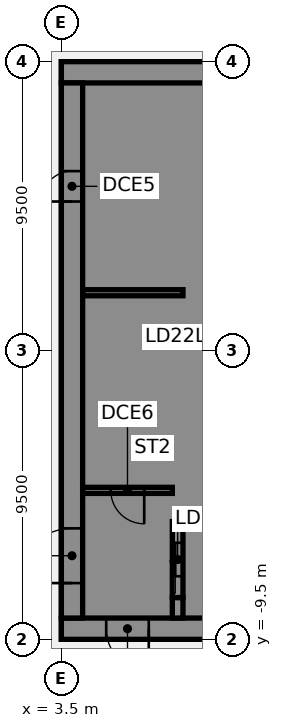
"""IFC4 building model, lengths in metres.
Left out: names, types, materials, properties, quantities, classifications, styles, units other than length and angle.
Written with IfcOpenShell. Run it as: python <this file> out.ifc"""

import sys

from ifc_helpers import new_model, si_unit, direction, frame, frame_2d, origin, place, context, subcontext, project, spatial, polyline, rectangle, outline, extrude, element, fill, save


model = new_model("IFC4")
c1 = context("Model", 3, precision=1e-05, world=origin(), true_north=direction((0.0, 1.0)))
c2 = subcontext(c1, "Body", "Model", "MODEL_VIEW")
j1 = project(units=[si_unit("LENGTHUNIT", "METRE"), si_unit("PLANEANGLEUNIT", "RADIAN")], contexts=[c1])
p1 = place(None, origin())
s1 = spatial("IfcSite", under=j1, at=p1, CompositionType="ELEMENT")
p2 = place(p1, origin())
s2 = spatial("IfcBuilding", under=s1, at=p2, CompositionType="ELEMENT")
p3 = place(p2, frame((0.0, 0.0, 29.5)))
s3 = spatial("IfcBuildingStorey", under=s2, at=p3, CompositionType="ELEMENT", Elevation=29.5)
p4 = place(p3, frame((16.5, -9.15, 0.0), z_axis=(0.0, 0.0, 1.0), x_axis=(-1.0, 0.0, 0.0)))
e1 = element("IfcWall", 1, at=p4, inside=s3, PredefinedType="SHEAR", context=c2, shape_type="SweptSolid", body=[
    extrude(rectangle(XDim=13.0, YDim=0.7, at=frame_2d((6.5, 0.0))), origin(), (0.0, 0.0, 1.0), 4.36),
])
p5 = place(p4, frame((4.15, 0.0, 0.0)))
e2 = element("IfcOpeningElement", 2, at=p5, cuts=e1, PredefinedType="OPENING", context=c2, shape_type="SweptSolid", body=[
    extrude(rectangle(XDim=1.4, YDim=2.1, at=frame_2d((0.7, 1.05))), frame((0.0, 0.36, 0.0), z_axis=(0.0, -1.0, 0.0), x_axis=(1.0, 0.0, 0.0)), (0.0, 0.0, 1.0), 0.72),
])
p6 = place(p4, frame((10.125, 0.0, 0.0)))
e3 = element("IfcOpeningElement", 3, at=p6, cuts=e1, PredefinedType="OPENING", context=c2, shape_type="SweptSolid", body=[
    extrude(rectangle(XDim=1.4, YDim=2.1, at=frame_2d((0.7, 1.05))), frame((0.0, 0.36, 0.0), z_axis=(0.0, -1.0, 0.0), x_axis=(1.0, 0.0, 0.0)), (0.0, 0.0, 1.0), 0.72),
])
p7 = place(p3, frame((16.5, 9.15, 0.0), z_axis=(0.0, 0.0, 1.0), x_axis=(-1.0, 0.0, 0.0)))
e4 = element("IfcWall", 4, at=p7, inside=s3, PredefinedType="SHEAR", context=c2, shape_type="SweptSolid", body=[
    extrude(rectangle(XDim=13.0, YDim=0.7, at=frame_2d((6.5, 0.0))), origin(), (0.0, 0.0, 1.0), 4.36),
])
p8 = place(p7, frame((4.15, 0.0, 0.0)))
e5 = element("IfcOpeningElement", 5, at=p8, cuts=e4, PredefinedType="OPENING", context=c2, shape_type="SweptSolid", body=[
    extrude(rectangle(XDim=1.4, YDim=2.1, at=frame_2d((0.7, 1.05))), frame((0.0, 0.36, 0.0), z_axis=(0.0, -1.0, 0.0), x_axis=(1.0, 0.0, 0.0)), (0.0, 0.0, 1.0), 0.72),
])
p9 = place(p3, origin())
e6 = element("IfcWall", 6, at=p9, inside=s3, PredefinedType="SHEAR", context=c2, shape_type="SweptSolid", body=[
    extrude(outline(polyline([(9.8, -5.375), (7.5, -5.375), (7.5, -2.875), (9.8, -2.875), (9.8, -2.625), (7.5, -2.625), (7.5, -0.125), (9.8, -0.125), (9.8, 0.125), (7.5, 0.125), (7.5, 2.625), (9.8, 2.625), (9.8, 2.875), (7.5, 2.875), (7.5, 5.375), (9.8, 5.375), (9.8, 5.625), (7.5, 5.625), (7.5, 8.125), (9.8, 8.125), (9.8, 8.8), (7.5, 8.8), (7.15, 8.8), (7.15, -5.625), (7.5, -5.625), (9.8, -5.625), (9.8, -5.375)])), origin(), (0.0, 0.0, 1.0), 4.36),
])
p10 = place(p3, origin())
e7 = element("IfcWall", 7, at=p10, inside=s3, PredefinedType="SHEAR", context=c2, shape_type="SweptSolid", body=[
    extrude(outline(polyline([(7.5, -8.125), (7.5, -8.8), (9.8, -8.8), (9.8, -8.125), (9.8, -5.625), (9.55, -5.625), (9.55, -8.125), (7.5, -8.125)])), origin(), (0.0, 0.0, 1.0), 4.36),
])
p11 = place(p3, frame((7.325, -8.8, 0.0), z_axis=(0.0, 0.0, 1.0), x_axis=(0.0, 1.0, 0.0)))
e8 = element("IfcWall", 8, at=p11, inside=s3, PredefinedType="SHEAR", context=c2, shape_type="SweptSolid", body=[
    extrude(rectangle(XDim=0.675, YDim=0.35, at=frame_2d((0.337, 0.0))), origin(), (0.0, 0.0, 1.0), 4.36),
])
p12 = place(p3, frame((7.5, 1.9, 0.0), z_axis=(0.0, 0.0, 1.0), x_axis=(-1.0, 0.0, 0.0)))
e9 = element("IfcWall", 9, at=p12, inside=s3, PredefinedType="SHEAR", context=c2, shape_type="SweptSolid", body=[
    extrude(rectangle(XDim=3.3, YDim=0.2, at=frame_2d((1.65, 0.0))), origin(), (0.0, 0.0, 1.0), 4.36),
])
p13 = place(p3, frame((7.325, -8.125, 0.0), z_axis=(0.0, 0.0, 1.0), x_axis=(0.0, 1.0, 0.0)))
e10 = element("IfcWall", 10, at=p13, inside=s3, PredefinedType="SHEAR", context=c2, shape_type="SweptSolid", body=[
    extrude(rectangle(XDim=2.5, YDim=0.35, at=frame_2d((1.25, 0.0))), origin(), (0.0, 0.0, 1.0), 4.36),
])
p14 = place(p13, frame((0.7, 0.0, 0.0)))
e11 = element("IfcOpeningElement", 11, at=p14, cuts=e10, PredefinedType="OPENING", context=c2, shape_type="SweptSolid", body=[
    extrude(rectangle(XDim=1.1, YDim=2.1, at=frame_2d((0.55, 1.05))), frame((0.0, 0.185, 0.0), z_axis=(0.0, -1.0, 0.0), x_axis=(1.0, 0.0, 0.0)), (0.0, 0.0, 1.0), 0.37),
])
p15 = place(p3, frame((3.85, -8.8, 0.0), z_axis=(0.0, 0.0, 1.0), x_axis=(0.0, 1.0, 0.0)))
e12 = element("IfcWall", 12, at=p15, inside=s3, PredefinedType="SHEAR", context=c2, shape_type="SweptSolid", body=[
    extrude(rectangle(XDim=17.6, YDim=0.7, at=frame_2d((8.8, 0.0))), origin(), (0.0, 0.0, 1.0), 4.36),
])
p16 = place(p15, frame((1.15, 0.0, 0.0)))
e13 = element("IfcOpeningElement", 13, at=p16, cuts=e12, PredefinedType="OPENING", context=c2, shape_type="SweptSolid", body=[
    extrude(rectangle(XDim=1.8, YDim=2.1, at=frame_2d((0.9, 1.05))), frame((0.0, 0.36, 0.0), z_axis=(0.0, -1.0, 0.0), x_axis=(1.0, 0.0, 0.0)), (0.0, 0.0, 1.0), 0.72),
])
p17 = place(p15, frame((13.7, 0.0, 0.0)))
e14 = element("IfcOpeningElement", 14, at=p17, cuts=e12, PredefinedType="OPENING", context=c2, shape_type="SweptSolid", body=[
    extrude(rectangle(XDim=1.0, YDim=2.1, at=frame_2d((0.5, 1.05))), frame((0.0, 0.36, 0.0), z_axis=(0.0, -1.0, 0.0), x_axis=(1.0, 0.0, 0.0)), (0.0, 0.0, 1.0), 0.72),
])
p18 = place(p3, frame((7.15, -4.6, 0.0), z_axis=(0.0, 0.0, 1.0), x_axis=(-1.0, 0.0, 0.0)))
e15 = element("IfcWall", 15, at=p18, inside=s3, PredefinedType="SHEAR", context=c2, shape_type="SweptSolid", body=[
    extrude(rectangle(XDim=2.95, YDim=0.2, at=frame_2d((1.475, 0.0))), origin(), (0.0, 0.0, 1.0), 4.36),
])
p19 = place(p18, frame((0.925, 0.0, 0.0)))
e16 = element("IfcOpeningElement", 16, at=p19, cuts=e15, PredefinedType="OPENING", context=c2, shape_type="SweptSolid", body=[
    extrude(rectangle(XDim=1.1, YDim=2.1, at=frame_2d((0.55, 1.05))), frame((0.0, 0.11, 0.0), z_axis=(0.0, -1.0, 0.0), x_axis=(1.0, 0.0, 0.0)), (0.0, 0.0, 1.0), 0.22),
])
p20 = place(p6, origin())
e17 = element("IfcDoor", 17, at=p20, inside=s3, OperationType="SINGLE_SWING_LEFT", PredefinedType="DOOR", context=c2, shape_type="SweptSolid", body=[
    extrude(rectangle(XDim=1.4, YDim=2.1, at=frame_2d((0.7, 1.05))), frame((0.0, 0.025, 0.0), z_axis=(0.0, -1.0, 0.0), x_axis=(1.0, 0.0, 0.0)), (0.0, 0.0, 1.0), 0.05),
])
fill(e3, e17)
p21 = place(p16, origin())
e18 = element("IfcDoor", 18, at=p21, inside=s3, OperationType="SINGLE_SWING_LEFT", PredefinedType="DOOR", context=c2, shape_type="SweptSolid", body=[
    extrude(rectangle(XDim=1.8, YDim=2.1, at=frame_2d((0.9, 1.05))), frame((0.0, 0.025, 0.0), z_axis=(0.0, -1.0, 0.0), x_axis=(1.0, 0.0, 0.0)), (0.0, 0.0, 1.0), 0.05),
])
fill(e13, e18)
p22 = place(p17, origin())
e19 = element("IfcDoor", 19, at=p22, inside=s3, OperationType="SINGLE_SWING_LEFT", PredefinedType="DOOR", context=c2, shape_type="SweptSolid", body=[
    extrude(rectangle(XDim=1.0, YDim=2.1, at=frame_2d((0.5, 1.05))), frame((0.0, 0.025, 0.0), z_axis=(0.0, -1.0, 0.0), x_axis=(1.0, 0.0, 0.0)), (0.0, 0.0, 1.0), 0.05),
])
fill(e14, e19)
p23 = place(p19, origin())
e20 = element("IfcDoor", 20, at=p23, inside=s3, OperationType="SINGLE_SWING_LEFT", PredefinedType="DOOR", context=c2, shape_type="SweptSolid", body=[
    extrude(rectangle(XDim=1.1, YDim=2.1, at=frame_2d((0.55, 1.05))), frame((0.0, 0.025, 0.0), z_axis=(0.0, -1.0, 0.0), x_axis=(1.0, 0.0, 0.0)), (0.0, 0.0, 1.0), 0.05),
])
fill(e16, e20)
p24 = place(p14, origin())
e21 = element("IfcDoor", 21, at=p24, inside=s3, OperationType="SLIDING_TO_LEFT", PredefinedType="DOOR", context=c2, shape_type="SweptSolid", body=[
    extrude(rectangle(XDim=1.1, YDim=2.1, at=frame_2d((0.55, 1.05))), frame((0.0, 0.025, 0.0), z_axis=(0.0, -1.0, 0.0), x_axis=(1.0, 0.0, 0.0)), (0.0, 0.0, 1.0), 0.05),
])
fill(e11, e21)
save(model, sys.argv[1])
